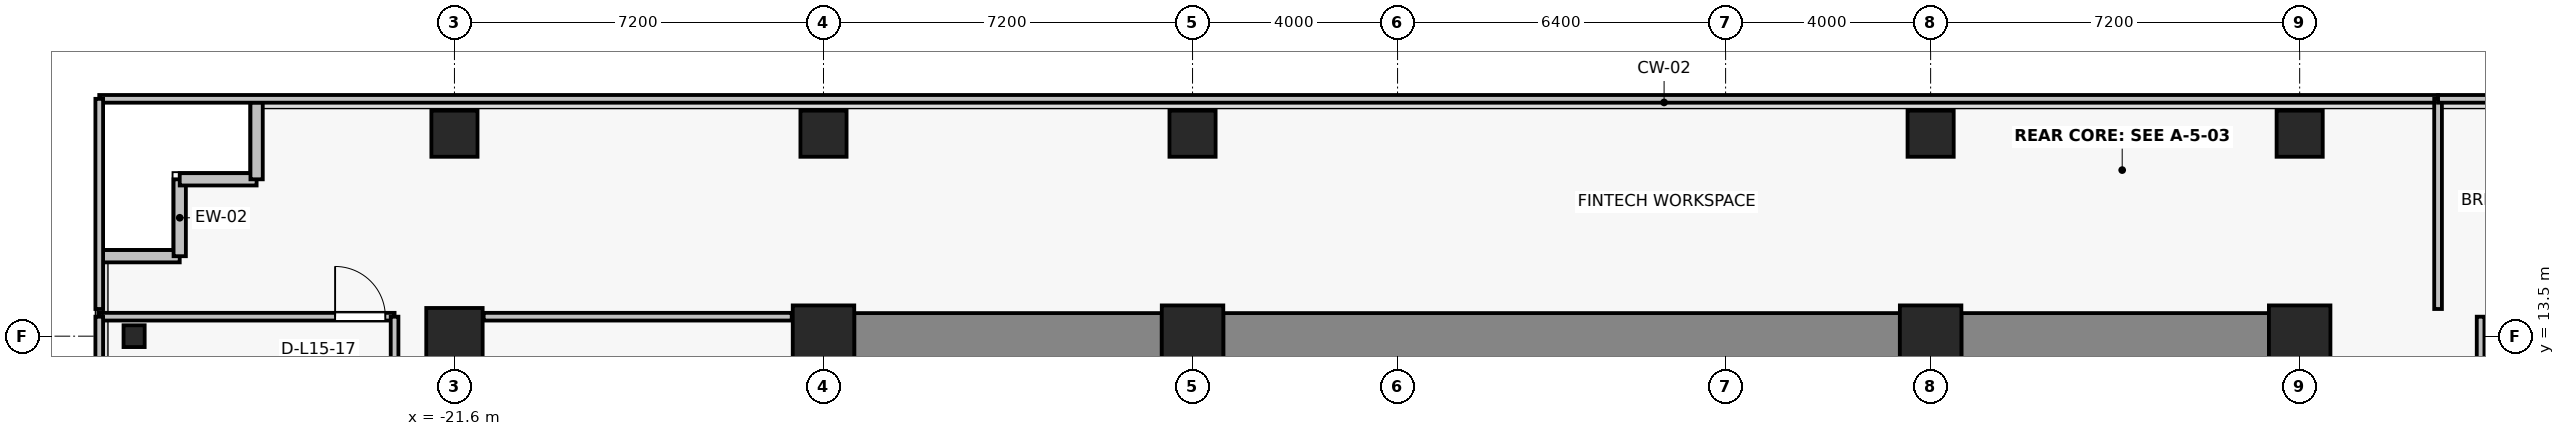
"""IFC4 building model, lengths in metres.
Left out: names, types, materials, properties, quantities, classifications, styles, units other than length and angle.
Written with IfcOpenShell. Run it as: python <this file> out.ifc"""

import sys

from ifc_helpers import new_model, si_unit, direction, frame, frame_2d, origin, origin_2d, place, context, subcontext, project, spatial, rectangle, i_section, extrude, source, transform, mapped, element, fill, save


model = new_model("IFC4")
c1 = context("Model", 3, precision=1e-05, world=origin(), true_north=direction((0.0, 1.0)))
c2 = subcontext(c1, "Body", "Model", "MODEL_VIEW")
j1 = project(units=[si_unit("LENGTHUNIT", "METRE"), si_unit("PLANEANGLEUNIT", "RADIAN")], contexts=[c1])
p1 = place(None, origin())
s1 = spatial("IfcSite", under=j1, at=p1, CompositionType="ELEMENT")
p2 = place(p1, origin())
s2 = spatial("IfcBuilding", under=s1, at=p2, CompositionType="ELEMENT")
p3 = place(p2, frame((0.0, 0.0, 57.1)))
s3 = spatial("IfcBuildingStorey", under=s2, at=p3, CompositionType="ELEMENT", Elevation=57.1)
for number, where, z_axis, x_axis in (
    (1, (-14.4, 13.5, 0.0), (0.0, 0.0, 1.0), (1.0, 0.0, 0.0)),
    (2, (-7.2, 13.5, 0.0), (0.0, 0.0, 1.0), (1.0, 0.0, 0.0)),
    (3, (7.2, 13.5, 0.0), (0.0, 0.0, 1.0), (1.0, 0.0, 0.0)),
    (4, (14.4, 13.5, 0.0), (0.0, 0.0, 1.0), (1.0, 0.0, 0.0)),
):
    element("IfcColumn", number, at=place(p3, frame(where, z_axis=z_axis, x_axis=x_axis)), inside=s3, PredefinedType="COLUMN", context=c2, shape_type="SweptSolid", body=[
        extrude(rectangle(XDim=1.2, YDim=1.2, at=origin_2d()), origin(), (0.0, 0.0, 1.0), 3.3),
    ])
p4 = place(p3, frame((-21.6, 13.5, 0.0), z_axis=(0.0, 0.0, 1.0), x_axis=(1.0, 0.0, 0.0)))
e5 = element("IfcColumn", 5, at=p4, inside=s3, PredefinedType="COLUMN", context=c2, shape_type="SweptSolid", body=[
    extrude(rectangle(XDim=1.1, YDim=1.1, at=origin_2d()), origin(), (0.0, 0.0, 1.0), 3.3),
])
for number, where, z_axis, x_axis in (
    (6, (-14.4, 17.45, 0.0), (0.0, 0.0, 1.0), (1.0, 0.0, 0.0)),
    (7, (-7.2, 17.45, 0.0), (0.0, 0.0, 1.0), (1.0, 0.0, 0.0)),
    (8, (7.2, 17.45, 0.0), (0.0, 0.0, 1.0), (1.0, 0.0, 0.0)),
    (9, (14.4, 17.45, 0.0), (0.0, 0.0, 1.0), (1.0, 0.0, 0.0)),
    (10, (-21.6, 17.45, 0.0), (0.0, 0.0, 1.0), (1.0, 0.0, 0.0)),
):
    element("IfcColumn", number, at=place(p3, frame(where, z_axis=z_axis, x_axis=x_axis)), inside=s3, PredefinedType="COLUMN", context=c2, shape_type="SweptSolid", body=[
        extrude(rectangle(XDim=0.9, YDim=0.9, at=origin_2d()), origin(), (0.0, 0.0, 1.0), 3.3),
    ])
p5 = place(p3, frame((-27.85, 13.5, 0.0), z_axis=(0.0, 0.0, 1.0), x_axis=(1.0, 0.0, 0.0)))
e11 = element("IfcColumn", 11, at=p5, inside=s3, PredefinedType="COLUMN", context=c2, shape_type="SweptSolid", body=[
    extrude(i_section(OverallWidth=0.412, OverallDepth=0.425, WebThickness=0.026, FlangeThickness=0.039, FilletRadius=0.015, at=origin_2d()), origin(), (0.0, 0.0, 1.0), 3.3),
])
p6 = place(p3, frame((-13.8, 13.5, 0.0), z_axis=(0.0, 0.0, 1.0), x_axis=(1.0, 0.0, 0.0)))
e12 = element("IfcWall", 12, at=p6, inside=s3, PredefinedType="SHEAR", context=c2, shape_type="SweptSolid", body=[
    extrude(rectangle(XDim=6.0, YDim=0.9, at=frame_2d((3.0, 0.0))), origin(), (0.0, 0.0, 1.0), 3.075),
])
p7 = place(p3, frame((-6.6, 13.5, 0.0), z_axis=(0.0, 0.0, 1.0), x_axis=(1.0, 0.0, 0.0)))
e13 = element("IfcWall", 13, at=p7, inside=s3, PredefinedType="SHEAR", context=c2, shape_type="SweptSolid", body=[
    extrude(rectangle(XDim=13.2, YDim=0.9, at=frame_2d((6.6, 0.0))), origin(), (0.0, 0.0, 1.0), 3.075),
])
p8 = place(p3, frame((7.8, 13.5, 0.0), z_axis=(0.0, 0.0, 1.0), x_axis=(1.0, 0.0, 0.0)))
e14 = element("IfcWall", 14, at=p8, inside=s3, PredefinedType="SHEAR", context=c2, shape_type="SweptSolid", body=[
    extrude(rectangle(XDim=6.0, YDim=0.9, at=frame_2d((3.0, 0.0))), origin(), (0.0, 0.0, 1.0), 3.075),
])
for number, where, z_axis, x_axis in (
    (15, (-26.96, 15.06, 0.0), (0.0, 0.0, 1.0), (-1.0, 0.0, 0.0)),
    (16, (-26.96, 16.56, 0.0), (0.0, 0.0, 1.0), (0.0, -1.0, 0.0)),
    (17, (-25.46, 16.56, 0.0), (0.0, 0.0, 1.0), (-1.0, 0.0, 0.0)),
    (18, (-25.46, 18.06, 0.0), (0.0, 0.0, 1.0), (0.0, -1.0, 0.0)),
):
    element("IfcWall", number, at=place(p3, frame(where, z_axis=z_axis, x_axis=x_axis)), inside=s3, PredefinedType="SOLIDWALL", context=c2, shape_type="SweptSolid", body=[
        extrude(rectangle(XDim=1.5, YDim=0.24, at=frame_2d((0.75, 0.0))), origin(), (0.0, 0.0, 1.0), 3.075),
    ])
p9 = place(p3, frame((-28.53, 13.88, 0.0), z_axis=(0.0, 0.0, 1.0), x_axis=(1.0, 0.0, 0.0)))
e19 = element("IfcWall", 19, at=p9, inside=s3, PredefinedType="PARTITIONING", context=c2, shape_type="SweptSolid", body=[
    extrude(rectangle(XDim=5.761, YDim=0.15, at=frame_2d((2.881, 0.0))), origin(), (0.0, 0.0, 1.0), 3.075),
])
p10 = place(p9, frame((4.602, 0.0, 0.0)))
e20 = element("IfcOpeningElement", 20, at=p10, cuts=e19, PredefinedType="OPENING", context=c2, shape_type="SweptSolid", body=[
    extrude(rectangle(XDim=0.98, YDim=2.15, at=frame_2d((0.49, 1.075))), frame((0.0, 0.085, 0.0), z_axis=(0.0, -1.0, 0.0), x_axis=(1.0, 0.0, 0.0)), (0.0, 0.0, 1.0), 0.17),
])
p11 = place(p3, frame((-28.53, -1.77, 0.0), z_axis=(0.0, 0.0, 1.0), x_axis=(0.0, 1.0, 0.0)))
e21 = element("IfcWall", 21, at=p11, inside=s3, PredefinedType="PARTITIONING", context=c2, shape_type="SweptSolid", body=[
    extrude(rectangle(XDim=15.65, YDim=0.15, at=frame_2d((7.825, 0.0))), origin(), (0.0, 0.0, 1.0), 3.075),
])
p12 = place(p3, frame((-22.769, 13.88, 0.0), z_axis=(0.0, 0.0, 1.0), x_axis=(0.0, -1.0, 0.0)))
e22 = element("IfcWall", 22, at=p12, inside=s3, PredefinedType="PARTITIONING", context=c2, shape_type="SweptSolid", body=[
    extrude(rectangle(XDim=15.65, YDim=0.15, at=frame_2d((7.825, 0.0))), origin(), (0.0, 0.0, 1.0), 2.465),
])
p13 = place(p3, frame((-21.03, 13.88, 0.0), z_axis=(0.0, 0.0, 1.0), x_axis=(1.0, 0.0, 0.0)))
e23 = element("IfcWall", 23, at=p13, inside=s3, PredefinedType="PARTITIONING", context=c2, shape_type="SweptSolid", body=[
    extrude(rectangle(XDim=6.01, YDim=0.15, at=frame_2d((3.005, 0.0))), origin(), (0.0, 0.0, 1.0), 3.075),
])
p14 = place(p3, frame((17.93, -1.77, 0.0), z_axis=(0.0, 0.0, 1.0), x_axis=(0.0, 1.0, 0.0)))
e24 = element("IfcWall", 24, at=p14, inside=s3, PredefinedType="PARTITIONING", context=c2, shape_type="SweptSolid", body=[
    extrude(rectangle(XDim=15.65, YDim=0.15, at=frame_2d((7.825, 0.0))), origin(), (0.0, 0.0, 1.0), 2.465),
])
p15 = place(p14, frame((7.335, 0.0, 0.0)))
e25 = element("IfcOpeningElement", 25, at=p15, cuts=e24, PredefinedType="OPENING", context=c2, shape_type="SweptSolid", body=[
    extrude(rectangle(XDim=0.98, YDim=2.15, at=frame_2d((0.49, 1.075))), frame((0.0, 0.085, 0.0), z_axis=(0.0, -1.0, 0.0), x_axis=(1.0, 0.0, 0.0)), (0.0, 0.0, 1.0), 0.17),
])
p16 = place(p3, frame((-28.53, 18.13, 0.0), z_axis=(0.0, 0.0, 1.0), x_axis=(1.0, 0.0, 0.0)))
e26 = element("IfcWall", 26, at=p16, inside=s3, PredefinedType="PARTITIONING", context=c2, shape_type="SweptSolid", body=[
    extrude(rectangle(XDim=45.63, YDim=0.15, at=frame_2d((22.815, 0.0))), origin(), (0.0, 0.0, 1.0), 3.075),
])
p17 = place(p3, frame((-28.53, 14.03, 0.0), z_axis=(0.0, 0.0, 1.0), x_axis=(0.0, 1.0, 0.0)))
e27 = element("IfcWall", 27, at=p17, inside=s3, PredefinedType="PARTITIONING", context=c2, shape_type="SweptSolid", body=[
    extrude(rectangle(XDim=4.1, YDim=0.15, at=frame_2d((2.05, 0.0))), origin(), (0.0, 0.0, 1.0), 3.075),
])
p18 = place(p3, frame((17.1, 18.13, 0.0), z_axis=(0.0, 0.0, 1.0), x_axis=(0.0, -1.0, 0.0)))
e28 = element("IfcWall", 28, at=p18, inside=s3, PredefinedType="PARTITIONING", context=c2, shape_type="SweptSolid", body=[
    extrude(rectangle(XDim=4.1, YDim=0.15, at=frame_2d((2.05, 0.0))), origin(), (0.0, 0.0, 1.0), 2.465),
])
p19 = place(p3, frame((17.1, 18.13, 0.0), z_axis=(0.0, 0.0, 1.0), x_axis=(1.0, 0.0, 0.0)))
e29 = element("IfcWall", 29, at=p19, inside=s3, PredefinedType="PARTITIONING", context=c2, shape_type="SweptSolid", body=[
    extrude(rectangle(XDim=15.43, YDim=0.15, at=frame_2d((7.715, 0.0))), origin(), (0.0, 0.0, 1.0), 3.075),
])
m1 = source(origin(), c2, "Body", "SweptSolid", [
    extrude(rectangle(XDim=0.98, YDim=2.15, at=frame_2d((0.49, 1.075))), frame((0.0, 0.025, 0.0), z_axis=(0.0, -1.0, 0.0), x_axis=(1.0, 0.0, 0.0)), (0.0, 0.0, 1.0), 0.05),
])
p20 = place(p10, origin())
e30 = element("IfcDoor", 30, at=p20, inside=s3, OperationType="SINGLE_SWING_LEFT", PredefinedType="DOOR", context=c2, shape_type="MappedRepresentation", body=[
    mapped(m1, transform((0.0, 0.0, 0.0), x_axis=(1.0, 0.0, 0.0), y_axis=(0.0, 1.0, 0.0), z_axis=(0.0, 0.0, 1.0), scale=1.0)),
])
fill(e20, e30)
save(model, sys.argv[1])
